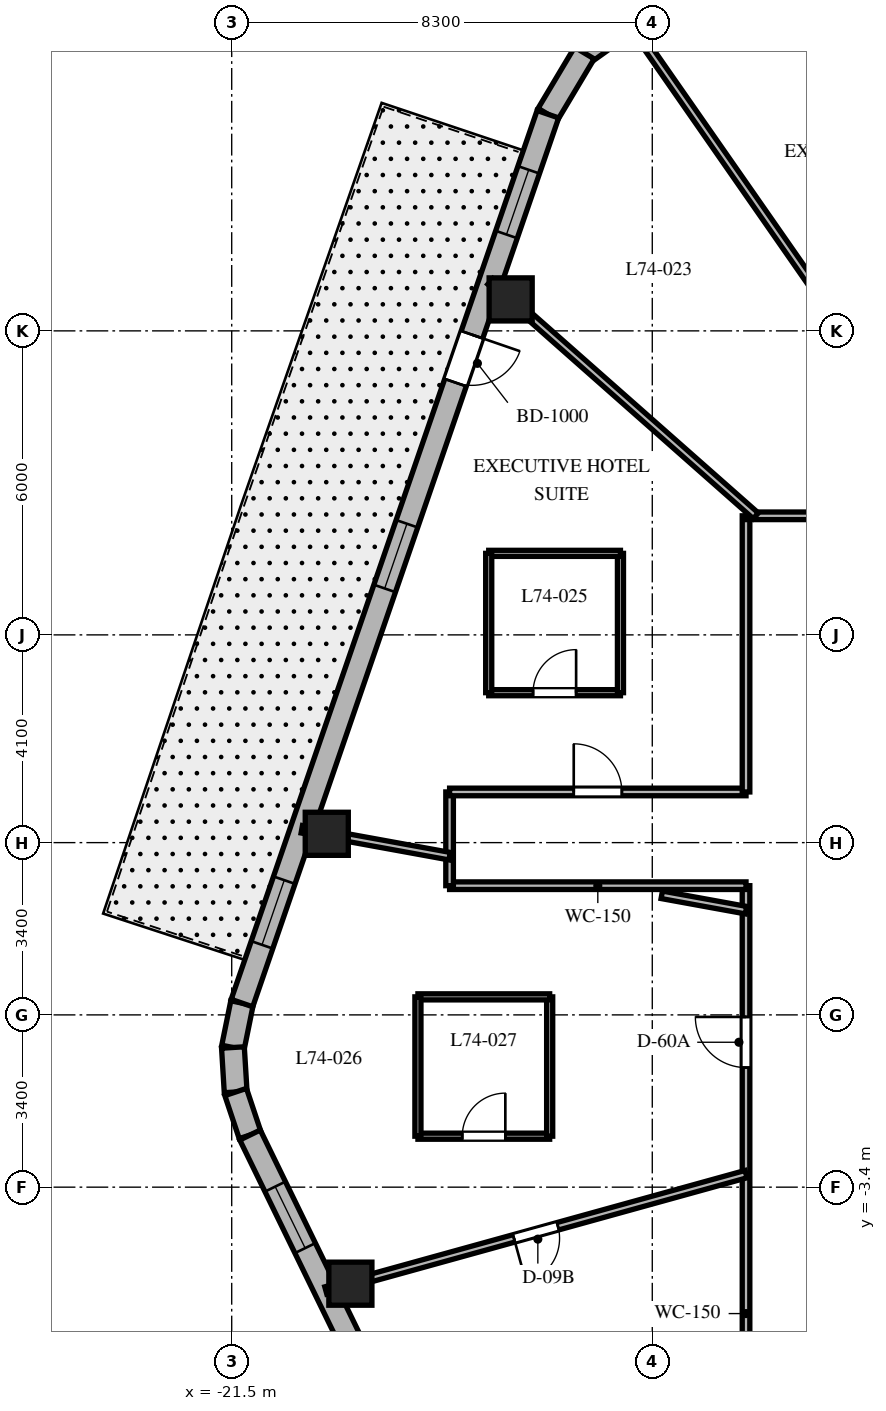
"""IFC4 building model, lengths in metres.
Left out: names, types, materials, properties, quantities, classifications, styles, units other than length and angle.
Written with IfcOpenShell. Run it as: python <this file> out.ifc"""

import sys

from ifc_helpers import new_model, si_unit, direction, frame, frame_2d, origin, origin_2d, place, context, subcontext, project, spatial, rectangle, extrude, element, fill, save


model = new_model("IFC4")
c1 = context("Model", 3, precision=1e-05, world=origin(), true_north=direction((0.0, 1.0)))
c2 = subcontext(c1, "Body", "Model", "MODEL_VIEW")
j1 = project(units=[si_unit("LENGTHUNIT", "METRE"), si_unit("PLANEANGLEUNIT", "RADIAN")], contexts=[c1])
p1 = place(None, origin())
s1 = spatial("IfcSite", under=j1, at=p1, CompositionType="ELEMENT")
p2 = place(p1, origin())
s2 = spatial("IfcBuilding", under=s1, at=p2, CompositionType="ELEMENT")
p3 = place(p2, frame((0.0, 0.0, 297.6)))
s3 = spatial("IfcBuildingStorey", under=s2, at=p3, CompositionType="ELEMENT", Elevation=297.6)
for number, where, z_axis, x_axis in (
    (1, (-15.995, 14.121, 0.0), (0.0, 0.0, 1.0), (1.0, 0.0, 0.0)),
    (2, (-19.624, 3.574, 0.0), (0.0, 0.0, 1.0), (1.0, 0.0, 0.0)),
    (3, (-19.158, -5.305, 0.0), (0.0, 0.0, 1.0), (1.0, 0.0, 0.0)),
):
    element("IfcColumn", number, at=place(p3, frame(where, z_axis=z_axis, x_axis=x_axis)), inside=s3, PredefinedType="COLUMN", context=c2, shape_type="SweptSolid", body=[
        extrude(rectangle(XDim=0.85, YDim=0.85, at=origin_2d()), origin(), (0.0, 0.0, 1.0), 3.9),
    ])
p4 = place(p3, frame((-13.415, 19.787, 0.0), z_axis=(0.0, 0.0, 1.0), x_axis=(-0.814055493997, -0.580787097561, 0.0)))
e4 = element("IfcWall", 4, at=p4, inside=s3, PredefinedType="SOLIDWALL", context=c2, shape_type="SweptSolid", body=[
    extrude(rectangle(XDim=1.383, YDim=0.45, at=frame_2d((0.691, 0.0))), origin(), (0.0, 0.0, 1.0), 3.6),
])
p5 = place(p3, frame((-14.54, 18.984, 0.0), z_axis=(0.0, 0.0, 1.0), x_axis=(-0.512374906623, -0.858761873317, 0.0)))
e5 = element("IfcWall", 5, at=p5, inside=s3, PredefinedType="SOLIDWALL", context=c2, shape_type="SweptSolid", body=[
    extrude(rectangle(XDim=1.406, YDim=0.45, at=frame_2d((0.703, 0.0))), origin(), (0.0, 0.0, 1.0), 3.6),
])
p6 = place(p3, frame((-21.298, 0.233, 0.0), z_axis=(0.0, 0.0, 1.0), x_axis=(-0.199158176661, -0.979967356941, 0.0)))
e6 = element("IfcWall", 6, at=p6, inside=s3, PredefinedType="SOLIDWALL", context=c2, shape_type="SweptSolid", body=[
    extrude(rectangle(XDim=0.895, YDim=0.45, at=frame_2d((0.447, 0.0))), origin(), (0.0, 0.0, 1.0), 3.6),
])
p7 = place(p3, frame((-21.476, -0.644, 0.0), z_axis=(0.0, 0.0, 1.0), x_axis=(0.061031097918, -0.998135865044, 0.0)))
e7 = element("IfcWall", 7, at=p7, inside=s3, PredefinedType="SOLIDWALL", context=c2, shape_type="SweptSolid", body=[
    extrude(rectangle(XDim=0.88, YDim=0.45, at=frame_2d((0.44, 0.0))), origin(), (0.0, 0.0, 1.0), 3.6),
])
p8 = place(p3, frame((-21.422, -1.522, 0.0), z_axis=(0.0, 0.0, 1.0), x_axis=(0.316964162323, -0.94843751497, 0.0)))
e8 = element("IfcWall", 8, at=p8, inside=s3, PredefinedType="SOLIDWALL", context=c2, shape_type="SweptSolid", body=[
    extrude(rectangle(XDim=0.895, YDim=0.45, at=frame_2d((0.448, 0.0))), origin(), (0.0, 0.0, 1.0), 3.6),
])
p9 = place(p3, frame((-15.26, 17.776, 0.0), z_axis=(0.0, 0.0, 1.0), x_axis=(-0.325407437101, -0.945573899745, 0.0)))
e9 = element("IfcWall", 9, at=p9, inside=s3, PredefinedType="SOLIDWALL", context=c2, shape_type="SweptSolid", body=[
    extrude(rectangle(XDim=18.552, YDim=0.45, at=frame_2d((9.276, 0.0))), origin(), (0.0, 0.0, 1.0), 3.6),
])
p10 = place(p9, frame((4.602, 0.0, 0.0)))
e10 = element("IfcOpeningElement", 10, at=p10, cuts=e9, PredefinedType="OPENING", context=c2, shape_type="SweptSolid", body=[
    extrude(rectangle(XDim=1.0, YDim=2.15, at=frame_2d((0.5, 1.075))), frame((0.0, 0.235, 0.0), z_axis=(0.0, -1.0, 0.0), x_axis=(1.0, 0.0, 0.0)), (0.0, 0.0, 1.0), 0.47),
])
p11 = place(p9, frame((1.161, 0.0, 0.8)))
e11 = element("IfcOpeningElement", 11, at=p11, cuts=e9, PredefinedType="OPENING", context=c2, shape_type="SweptSolid", body=[
    extrude(rectangle(XDim=1.35, YDim=1.75, at=frame_2d((0.675, 0.875))), frame((0.0, 0.235, 0.0), z_axis=(0.0, -1.0, 0.0), x_axis=(1.0, 0.0, 0.0)), (0.0, 0.0, 1.0), 0.47),
])
p12 = place(p9, frame((8.548, 0.0, 0.8)))
e12 = element("IfcOpeningElement", 12, at=p12, cuts=e9, PredefinedType="OPENING", context=c2, shape_type="SweptSolid", body=[
    extrude(rectangle(XDim=1.35, YDim=1.75, at=frame_2d((0.675, 0.875))), frame((0.0, 0.235, 0.0), z_axis=(0.0, -1.0, 0.0), x_axis=(1.0, 0.0, 0.0)), (0.0, 0.0, 1.0), 0.47),
])
p13 = place(p9, frame((15.987, 0.0, 0.8)))
e13 = element("IfcOpeningElement", 13, at=p13, cuts=e9, PredefinedType="OPENING", context=c2, shape_type="SweptSolid", body=[
    extrude(rectangle(XDim=1.35, YDim=1.75, at=frame_2d((0.675, 0.875))), frame((0.0, 0.235, 0.0), z_axis=(0.0, -1.0, 0.0), x_axis=(1.0, 0.0, 0.0)), (0.0, 0.0, 1.0), 0.47),
])
p14 = place(p3, frame((-21.138, -2.371, 0.0), z_axis=(0.0, 0.0, 1.0), x_axis=(0.438128124058, -0.89891253574, 0.0)))
e14 = element("IfcWall", 14, at=p14, inside=s3, PredefinedType="SOLIDWALL", context=c2, shape_type="SweptSolid", body=[
    extrude(rectangle(XDim=17.565, YDim=0.45, at=frame_2d((8.782, 0.0))), origin(), (0.0, 0.0, 1.0), 3.6),
])
p15 = place(p14, frame((1.133, 0.0, 0.8)))
e15 = element("IfcOpeningElement", 15, at=p15, cuts=e14, PredefinedType="OPENING", context=c2, shape_type="SweptSolid", body=[
    extrude(rectangle(XDim=1.35, YDim=1.75, at=frame_2d((0.675, 0.875))), frame((0.0, 0.235, 0.0), z_axis=(0.0, -1.0, 0.0), x_axis=(1.0, 0.0, 0.0)), (0.0, 0.0, 1.0), 0.47),
])
p16 = place(p14, frame((8.158, 0.0, 0.8)))
e16 = element("IfcOpeningElement", 16, at=p16, cuts=e14, PredefinedType="OPENING", context=c2, shape_type="SweptSolid", body=[
    extrude(rectangle(XDim=1.35, YDim=1.75, at=frame_2d((0.675, 0.875))), frame((0.0, 0.235, 0.0), z_axis=(0.0, -1.0, 0.0), x_axis=(1.0, 0.0, 0.0)), (0.0, 0.0, 1.0), 0.47),
])
p17 = place(p14, frame((15.132, 0.0, 0.8)))
e17 = element("IfcOpeningElement", 17, at=p17, cuts=e14, PredefinedType="OPENING", context=c2, shape_type="SweptSolid", body=[
    extrude(rectangle(XDim=1.35, YDim=1.75, at=frame_2d((0.675, 0.875))), frame((0.0, 0.235, 0.0), z_axis=(0.0, -1.0, 0.0), x_axis=(1.0, 0.0, 0.0)), (0.0, 0.0, 1.0), 0.47),
])
p18 = place(p3, frame((-11.35, -9.85, 0.0), z_axis=(0.0, 0.0, 1.0), x_axis=(0.0, 1.0, 0.0)))
e18 = element("IfcWall", 18, at=p18, inside=s3, PredefinedType="PARTITIONING", context=c2, shape_type="SweptSolid", body=[
    extrude(rectangle(XDim=12.4, YDim=0.15, at=frame_2d((6.2, 0.0))), origin(), (0.0, 0.0, 1.0), 2.894),
])
p19 = place(p18, frame((8.81, 0.0, 0.0)))
e19 = element("IfcOpeningElement", 19, at=p19, cuts=e18, PredefinedType="OPENING", context=c2, shape_type="SweptSolid", body=[
    extrude(rectangle(XDim=1.0, YDim=2.03, at=frame_2d((0.5, 1.015))), frame((0.0, 0.085, 0.0), z_axis=(0.0, -1.0, 0.0), x_axis=(1.0, 0.0, 0.0)), (0.0, 0.0, 1.0), 0.17),
])
p20 = place(p3, frame((-11.35, 2.55, 0.0), z_axis=(0.0, 0.0, 1.0), x_axis=(-1.0, 0.0, 0.0)))
e20 = element("IfcWall", 20, at=p20, inside=s3, PredefinedType="PARTITIONING", context=c2, shape_type="SweptSolid", body=[
    extrude(rectangle(XDim=5.85, YDim=0.15, at=frame_2d((2.925, 0.0))), origin(), (0.0, 0.0, 1.0), 3.04),
])
p21 = place(p3, frame((-17.2, 2.55, 0.0), z_axis=(0.0, 0.0, 1.0), x_axis=(0.0, 1.0, 0.0)))
e21 = element("IfcWall", 21, at=p21, inside=s3, PredefinedType="PARTITIONING", context=c2, shape_type="SweptSolid", body=[
    extrude(rectangle(XDim=1.85, YDim=0.15, at=frame_2d((0.925, 0.0))), origin(), (0.0, 0.0, 1.0), 2.816),
])
p22 = place(p3, frame((-17.2, 4.4, 0.0), z_axis=(0.0, 0.0, 1.0), x_axis=(1.0, 0.0, 0.0)))
e22 = element("IfcWall", 22, at=p22, inside=s3, PredefinedType="PARTITIONING", context=c2, shape_type="SweptSolid", body=[
    extrude(rectangle(XDim=5.85, YDim=0.15, at=frame_2d((2.925, 0.0))), origin(), (0.0, 0.0, 1.0), 2.816),
])
p23 = place(p22, frame((2.45, 0.0, 0.0)))
e23 = element("IfcOpeningElement", 23, at=p23, cuts=e22, PredefinedType="OPENING", context=c2, shape_type="SweptSolid", body=[
    extrude(rectangle(XDim=0.95, YDim=2.03, at=frame_2d((0.475, 1.015))), frame((0.0, 0.085, 0.0), z_axis=(0.0, -1.0, 0.0), x_axis=(1.0, 0.0, 0.0)), (0.0, 0.0, 1.0), 0.17),
])
p24 = place(p3, frame((-11.35, 4.4, 0.0), z_axis=(0.0, 0.0, 1.0), x_axis=(0.0, 1.0, 0.0)))
e24 = element("IfcWall", 24, at=p24, inside=s3, PredefinedType="PARTITIONING", context=c2, shape_type="SweptSolid", body=[
    extrude(rectangle(XDim=5.45, YDim=0.15, at=frame_2d((2.725, 0.0))), origin(), (0.0, 0.0, 1.0), 2.816),
])
p25 = place(p3, frame((-11.35, 9.85, 0.0), z_axis=(0.0, 0.0, 1.0), x_axis=(1.0, 0.0, 0.0)))
e25 = element("IfcWall", 25, at=p25, inside=s3, PredefinedType="PARTITIONING", context=c2, shape_type="SweptSolid", body=[
    extrude(rectangle(XDim=10.43, YDim=0.15, at=frame_2d((5.215, 0.0))), origin(), (0.0, 0.0, 1.0), 2.894),
])
p26 = place(p25, frame((8.407, 0.0, 0.0)))
e26 = element("IfcOpeningElement", 26, at=p26, cuts=e25, PredefinedType="OPENING", context=c2, shape_type="SweptSolid", body=[
    extrude(rectangle(XDim=0.9, YDim=2.03, at=frame_2d((0.45, 1.015))), frame((0.0, 0.085, 0.0), z_axis=(0.0, -1.0, 0.0), x_axis=(1.0, 0.0, 0.0)), (0.0, 0.0, 1.0), 0.17),
])
p27 = place(p25, frame((5.541, 0.0, 0.0)))
e27 = element("IfcOpeningElement", 27, at=p27, cuts=e25, PredefinedType="OPENING", context=c2, shape_type="SweptSolid", body=[
    extrude(rectangle(XDim=0.9, YDim=2.03, at=frame_2d((0.45, 1.015))), frame((0.0, 0.085, 0.0), z_axis=(0.0, -1.0, 0.0), x_axis=(1.0, 0.0, 0.0)), (0.0, 0.0, 1.0), 0.17),
])
p28 = place(p25, frame((1.916, 0.0, 0.0)))
e28 = element("IfcOpeningElement", 28, at=p28, cuts=e25, PredefinedType="OPENING", context=c2, shape_type="SweptSolid", body=[
    extrude(rectangle(XDim=0.9, YDim=2.03, at=frame_2d((0.45, 1.015))), frame((0.0, 0.085, 0.0), z_axis=(0.0, -1.0, 0.0), x_axis=(1.0, 0.0, 0.0)), (0.0, 0.0, 1.0), 0.17),
])
p29 = place(p3, frame((-6.858, 9.85, 0.0), z_axis=(0.0, 0.0, 1.0), x_axis=(-0.571391702066, 0.820677477948, 0.0)))
e29 = element("IfcWall", 29, at=p29, inside=s3, PredefinedType="PARTITIONING", context=c2, shape_type="SweptSolid", body=[
    extrude(rectangle(XDim=11.738, YDim=0.15, at=frame_2d((5.869, 0.0))), origin(), (0.0, 0.0, 1.0), 2.894),
])
p30 = place(p3, frame((-11.157, 9.85, 0.0), z_axis=(0.0, 0.0, 1.0), x_axis=(-0.74966962095, 0.661812253909, 0.0)))
e30 = element("IfcWall", 30, at=p30, inside=s3, PredefinedType="PARTITIONING", context=c2, shape_type="SweptSolid", body=[
    extrude(rectangle(XDim=6.989, YDim=0.15, at=frame_2d((3.494, 0.0))), origin(), (0.0, 0.0, 1.0), 2.94),
])
p31 = place(p3, frame((-11.35, 2.067, 0.0), z_axis=(0.0, 0.0, 1.0), x_axis=(-0.983807459651, 0.179228575665, 0.0)))
e31 = element("IfcWall", 31, at=p31, inside=s3, PredefinedType="PARTITIONING", context=c2, shape_type="SweptSolid", body=[
    extrude(rectangle(XDim=1.69, YDim=0.15, at=frame_2d((0.845, 0.0))), origin(), (0.0, 0.0, 1.0), 3.6),
])
p32 = place(p3, frame((-17.2, 3.133, 0.0), z_axis=(0.0, 0.0, 1.0), x_axis=(-0.983817168797, 0.179175272791, 0.0)))
e32 = element("IfcWall", 32, at=p32, inside=s3, PredefinedType="PARTITIONING", context=c2, shape_type="SweptSolid", body=[
    extrude(rectangle(XDim=2.965, YDim=0.15, at=frame_2d((1.482, 0.0))), origin(), (0.0, 0.0, 1.0), 2.816),
])
p33 = place(p3, frame((-11.35, -3.143, 0.0), z_axis=(0.0, 0.0, 1.0), x_axis=(-0.963731818141, -0.266872596386, 0.0)))
e33 = element("IfcWall", 33, at=p33, inside=s3, PredefinedType="PARTITIONING", context=c2, shape_type="SweptSolid", body=[
    extrude(rectangle(XDim=8.605, YDim=0.15, at=frame_2d((4.302, 0.0))), origin(), (0.0, 0.0, 1.0), 2.894),
])
p34 = place(p33, frame((3.852, 0.0, 0.0)))
e34 = element("IfcOpeningElement", 34, at=p34, cuts=e33, PredefinedType="OPENING", context=c2, shape_type="SweptSolid", body=[
    extrude(rectangle(XDim=0.9, YDim=2.03, at=frame_2d((0.45, 1.015))), frame((0.0, 0.085, 0.0), z_axis=(0.0, -1.0, 0.0), x_axis=(1.0, 0.0, 0.0)), (0.0, 0.0, 1.0), 0.17),
])
p35 = place(p3, frame((-16.428, 6.359, 0.0), z_axis=(0.0, 0.0, 1.0), x_axis=(1.0, 0.0, 0.0)))
e35 = element("IfcWall", 35, at=p35, inside=s3, PredefinedType="PARTITIONING", context=c2, shape_type="SweptSolid", body=[
    extrude(rectangle(XDim=2.6, YDim=0.12, at=frame_2d((1.3, 0.0))), origin(), (0.0, 0.0, 1.0), 3.04),
])
p36 = place(p35, frame((0.875, 0.0, 0.0)))
e36 = element("IfcOpeningElement", 36, at=p36, cuts=e35, PredefinedType="OPENING", context=c2, shape_type="SweptSolid", body=[
    extrude(rectangle(XDim=0.85, YDim=2.03, at=frame_2d((0.425, 1.015))), frame((0.0, 0.07, 0.0), z_axis=(0.0, -1.0, 0.0), x_axis=(1.0, 0.0, 0.0)), (0.0, 0.0, 1.0), 0.14),
])
p37 = place(p3, frame((-13.828, 6.359, 0.0), z_axis=(0.0, 0.0, 1.0), x_axis=(0.0, 1.0, 0.0)))
e37 = element("IfcWall", 37, at=p37, inside=s3, PredefinedType="PARTITIONING", context=c2, shape_type="SweptSolid", body=[
    extrude(rectangle(XDim=2.75, YDim=0.12, at=frame_2d((1.375, 0.0))), origin(), (0.0, 0.0, 1.0), 3.04),
])
p38 = place(p3, frame((-13.828, 9.109, 0.0), z_axis=(0.0, 0.0, 1.0), x_axis=(-1.0, 0.0, 0.0)))
e38 = element("IfcWall", 38, at=p38, inside=s3, PredefinedType="PARTITIONING", context=c2, shape_type="SweptSolid", body=[
    extrude(rectangle(XDim=2.6, YDim=0.12, at=frame_2d((1.3, 0.0))), origin(), (0.0, 0.0, 1.0), 3.172),
])
p39 = place(p3, frame((-16.428, 9.109, 0.0), z_axis=(0.0, 0.0, 1.0), x_axis=(0.0, -1.0, 0.0)))
e39 = element("IfcWall", 39, at=p39, inside=s3, PredefinedType="PARTITIONING", context=c2, shape_type="SweptSolid", body=[
    extrude(rectangle(XDim=2.75, YDim=0.12, at=frame_2d((1.375, 0.0))), origin(), (0.0, 0.0, 1.0), 3.6),
])
p40 = place(p3, frame((-17.825, -2.394, 0.0), z_axis=(0.0, 0.0, 1.0), x_axis=(1.0, 0.0, 0.0)))
e40 = element("IfcWall", 40, at=p40, inside=s3, PredefinedType="PARTITIONING", context=c2, shape_type="SweptSolid", body=[
    extrude(rectangle(XDim=2.6, YDim=0.12, at=frame_2d((1.3, 0.0))), origin(), (0.0, 0.0, 1.0), 3.04),
])
p41 = place(p40, frame((0.875, 0.0, 0.0)))
e41 = element("IfcOpeningElement", 41, at=p41, cuts=e40, PredefinedType="OPENING", context=c2, shape_type="SweptSolid", body=[
    extrude(rectangle(XDim=0.85, YDim=2.03, at=frame_2d((0.425, 1.015))), frame((0.0, 0.07, 0.0), z_axis=(0.0, -1.0, 0.0), x_axis=(1.0, 0.0, 0.0)), (0.0, 0.0, 1.0), 0.14),
])
p42 = place(p3, frame((-15.225, -2.394, 0.0), z_axis=(0.0, 0.0, 1.0), x_axis=(0.0, 1.0, 0.0)))
e42 = element("IfcWall", 42, at=p42, inside=s3, PredefinedType="PARTITIONING", context=c2, shape_type="SweptSolid", body=[
    extrude(rectangle(XDim=2.75, YDim=0.12, at=frame_2d((1.375, 0.0))), origin(), (0.0, 0.0, 1.0), 3.6),
])
p43 = place(p3, frame((-15.225, 0.356, 0.0), z_axis=(0.0, 0.0, 1.0), x_axis=(-1.0, 0.0, 0.0)))
e43 = element("IfcWall", 43, at=p43, inside=s3, PredefinedType="PARTITIONING", context=c2, shape_type="SweptSolid", body=[
    extrude(rectangle(XDim=2.6, YDim=0.12, at=frame_2d((1.3, 0.0))), origin(), (0.0, 0.0, 1.0), 3.04),
])
p44 = place(p3, frame((-17.825, 0.356, 0.0), z_axis=(0.0, 0.0, 1.0), x_axis=(0.0, -1.0, 0.0)))
e44 = element("IfcWall", 44, at=p44, inside=s3, PredefinedType="PARTITIONING", context=c2, shape_type="SweptSolid", body=[
    extrude(rectangle(XDim=2.75, YDim=0.12, at=frame_2d((1.375, 0.0))), origin(), (0.0, 0.0, 1.0), 3.6),
])
p45 = place(p10, origin())
e45 = element("IfcDoor", 45, at=p45, inside=s3, OperationType="SINGLE_SWING_LEFT", PredefinedType="DOOR", context=c2, shape_type="SweptSolid", body=[
    extrude(rectangle(XDim=1.0, YDim=2.15, at=frame_2d((0.5, 1.075))), frame((0.0, 0.025, 0.0), z_axis=(0.0, -1.0, 0.0), x_axis=(1.0, 0.0, 0.0)), (0.0, 0.0, 1.0), 0.05),
])
fill(e10, e45)
p46 = place(p11, origin())
e46 = element("IfcWindow", 46, at=p46, inside=s3, PartitioningType="SINGLE_PANEL", PredefinedType="WINDOW", context=c2, shape_type="SweptSolid", body=[
    extrude(rectangle(XDim=1.35, YDim=1.75, at=frame_2d((0.675, 0.875))), frame((0.0, 0.03, 0.0), z_axis=(0.0, -1.0, 0.0), x_axis=(1.0, 0.0, 0.0)), (0.0, 0.0, 1.0), 0.06),
])
fill(e11, e46)
p47 = place(p12, origin())
e47 = element("IfcWindow", 47, at=p47, inside=s3, PartitioningType="SINGLE_PANEL", PredefinedType="WINDOW", context=c2, shape_type="SweptSolid", body=[
    extrude(rectangle(XDim=1.35, YDim=1.75, at=frame_2d((0.675, 0.875))), frame((0.0, 0.03, 0.0), z_axis=(0.0, -1.0, 0.0), x_axis=(1.0, 0.0, 0.0)), (0.0, 0.0, 1.0), 0.06),
])
fill(e12, e47)
p48 = place(p13, origin())
e48 = element("IfcWindow", 48, at=p48, inside=s3, PartitioningType="SINGLE_PANEL", PredefinedType="WINDOW", context=c2, shape_type="SweptSolid", body=[
    extrude(rectangle(XDim=1.35, YDim=1.75, at=frame_2d((0.675, 0.875))), frame((0.0, 0.03, 0.0), z_axis=(0.0, -1.0, 0.0), x_axis=(1.0, 0.0, 0.0)), (0.0, 0.0, 1.0), 0.06),
])
fill(e13, e48)
p49 = place(p15, origin())
e49 = element("IfcWindow", 49, at=p49, inside=s3, PartitioningType="SINGLE_PANEL", PredefinedType="WINDOW", context=c2, shape_type="SweptSolid", body=[
    extrude(rectangle(XDim=1.35, YDim=1.75, at=frame_2d((0.675, 0.875))), frame((0.0, 0.03, 0.0), z_axis=(0.0, -1.0, 0.0), x_axis=(1.0, 0.0, 0.0)), (0.0, 0.0, 1.0), 0.06),
])
fill(e15, e49)
p50 = place(p23, origin())
e50 = element("IfcDoor", 50, at=p50, inside=s3, OperationType="SINGLE_SWING_LEFT", PredefinedType="DOOR", context=c2, shape_type="SweptSolid", body=[
    extrude(rectangle(XDim=0.95, YDim=2.03, at=frame_2d((0.475, 1.015))), frame((0.0, 0.025, 0.0), z_axis=(0.0, -1.0, 0.0), x_axis=(1.0, 0.0, 0.0)), (0.0, 0.0, 1.0), 0.05),
])
fill(e23, e50)
p51 = place(p36, origin())
e51 = element("IfcDoor", 51, at=p51, inside=s3, OperationType="SINGLE_SWING_RIGHT", PredefinedType="DOOR", context=c2, shape_type="SweptSolid", body=[
    extrude(rectangle(XDim=0.85, YDim=2.03, at=frame_2d((0.425, 1.015))), frame((0.0, 0.025, 0.0), z_axis=(0.0, -1.0, 0.0), x_axis=(1.0, 0.0, 0.0)), (0.0, 0.0, 1.0), 0.05),
])
fill(e36, e51)
p52 = place(p19, origin())
e52 = element("IfcDoor", 52, at=p52, inside=s3, OperationType="SINGLE_SWING_RIGHT", PredefinedType="DOOR", context=c2, shape_type="SweptSolid", body=[
    extrude(rectangle(XDim=1.0, YDim=2.03, at=frame_2d((0.5, 1.015))), frame((0.0, 0.025, 0.0), z_axis=(0.0, -1.0, 0.0), x_axis=(1.0, 0.0, 0.0)), (0.0, 0.0, 1.0), 0.05),
])
fill(e19, e52)
p53 = place(p34, origin())
e53 = element("IfcDoor", 53, at=p53, inside=s3, OperationType="SINGLE_SWING_RIGHT", PredefinedType="DOOR", context=c2, shape_type="SweptSolid", body=[
    extrude(rectangle(XDim=0.9, YDim=2.03, at=frame_2d((0.45, 1.015))), frame((0.0, 0.025, 0.0), z_axis=(0.0, -1.0, 0.0), x_axis=(1.0, 0.0, 0.0)), (0.0, 0.0, 1.0), 0.05),
])
fill(e34, e53)
p54 = place(p41, origin())
e54 = element("IfcDoor", 54, at=p54, inside=s3, OperationType="SINGLE_SWING_RIGHT", PredefinedType="DOOR", context=c2, shape_type="SweptSolid", body=[
    extrude(rectangle(XDim=0.85, YDim=2.03, at=frame_2d((0.425, 1.015))), frame((0.0, 0.025, 0.0), z_axis=(0.0, -1.0, 0.0), x_axis=(1.0, 0.0, 0.0)), (0.0, 0.0, 1.0), 0.05),
])
fill(e41, e54)
save(model, sys.argv[1])
